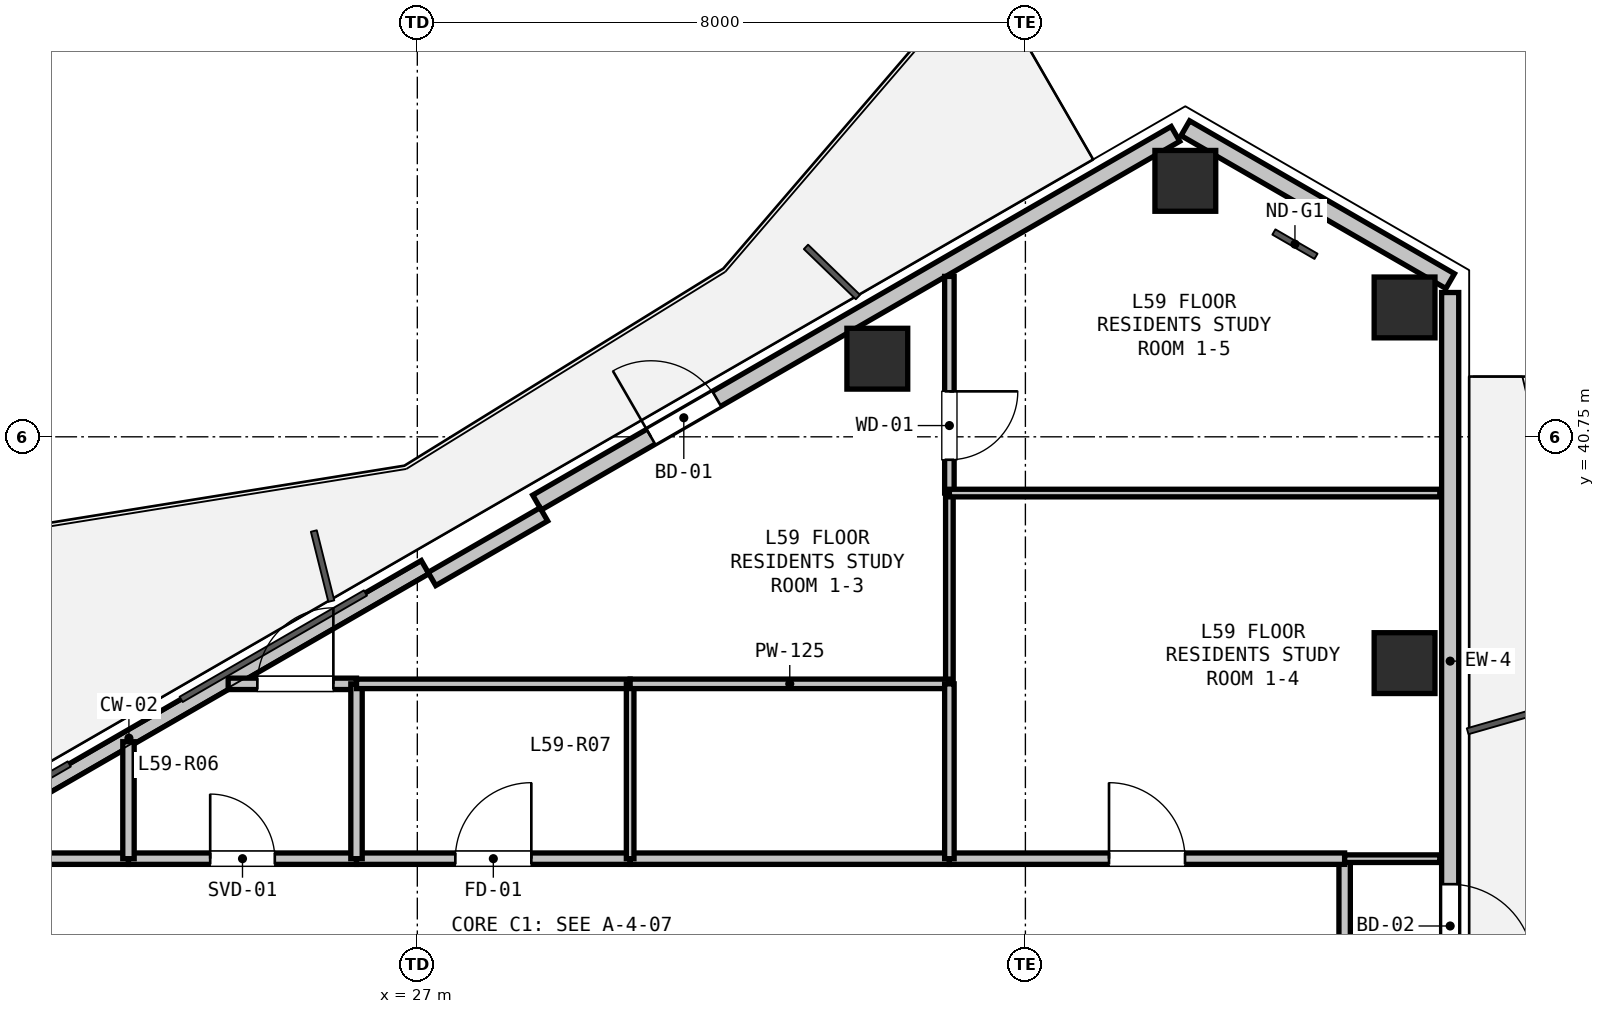
"""IFC4 building model, lengths in metres.
Left out: names, types, materials, properties, quantities, classifications, styles, units other than length and angle.
Written with IfcOpenShell. Run it as: python <this file> out.ifc"""

import sys

from ifc_helpers import new_model, si_unit, direction, frame, frame_2d, origin, origin_2d, place, context, subcontext, project, spatial, rectangle, hollow_rectangle, extrude, element, fill, save


model = new_model("IFC4")
c1 = context("Model", 3, precision=1e-05, world=origin(), true_north=direction((0.0, 1.0)))
c2 = subcontext(c1, "Body", "Model", "MODEL_VIEW")
j1 = project(units=[si_unit("LENGTHUNIT", "METRE"), si_unit("PLANEANGLEUNIT", "RADIAN")], contexts=[c1])
p1 = place(None, origin())
s1 = spatial("IfcSite", under=j1, at=p1, CompositionType="ELEMENT")
p2 = place(p1, origin())
s2 = spatial("IfcBuilding", under=s1, at=p2, CompositionType="ELEMENT")
p3 = place(p2, frame((0.0, 0.0, 211.8)))
s3 = spatial("IfcBuildingStorey", under=s2, at=p3, CompositionType="ELEMENT", Elevation=211.8)
for number, where, z_axis, x_axis in (
    (1, (33.052, 41.778, 0.0), (0.0, 0.0, 1.0), (1.0, 0.0, 0.0)),
    (2, (37.104, 44.117, 0.0), (0.0, 0.0, 1.0), (1.0, 0.0, 0.0)),
    (3, (39.988, 42.452, 0.0), (0.0, 0.0, 1.0), (1.0, 0.0, 0.0)),
    (4, (39.988, 37.773, 0.0), (0.0, 0.0, 1.0), (1.0, 0.0, 0.0)),
):
    element("IfcColumn", number, at=place(p3, frame(where, z_axis=z_axis, x_axis=x_axis)), inside=s3, PredefinedType="COLUMN", context=c2, shape_type="SweptSolid", body=[
        extrude(hollow_rectangle(XDim=0.8, YDim=0.8, WallThickness=0.025, at=origin_2d()), origin(), (0.0, 0.0, 1.0), 3.3),
    ])
p4 = place(p3, frame((37.104, 44.81, 0.0), z_axis=(0.0, 0.0, 1.0), x_axis=(0.866023907196, -0.500002592159, 0.0)))
e5 = element("IfcWall", 5, at=p4, inside=s3, PredefinedType="SOLIDWALL", context=c2, shape_type="SweptSolid", body=[
    extrude(rectangle(XDim=4.023, YDim=0.225, at=frame_2d((2.012, 0.0))), origin(), (0.0, 0.0, 1.0), 2.69),
])
p5 = place(p3, frame((19.309, 34.536, 0.0), z_axis=(0.0, 0.0, 1.0), x_axis=(0.866020680503, 0.500008180874, 0.0)))
e6 = element("IfcWall", 6, at=p5, inside=s3, PredefinedType="PARAPET", context=c2, shape_type="SweptSolid", body=[
    extrude(rectangle(XDim=8.999, YDim=0.2, at=frame_2d((4.5, 0.0))), origin(), (0.0, 0.0, 1.0), 0.2),
])
p6 = place(p3, frame((28.575, 39.885, 0.0), z_axis=(0.0, 0.0, 1.0), x_axis=(0.866016233231, 0.500015883528, 0.0)))
e7 = element("IfcWall", 7, at=p6, inside=s3, PredefinedType="SOLIDWALL", context=c2, shape_type="SweptSolid", body=[
    extrude(rectangle(XDim=9.699, YDim=0.225, at=frame_2d((4.85, 0.0))), origin(), (0.0, 0.0, 1.0), 2.69),
])
p7 = place(p6, frame((1.73, 0.0, 0.0)))
e8 = element("IfcOpeningElement", 8, at=p7, cuts=e7, PredefinedType="OPENING", context=c2, shape_type="SweptSolid", body=[
    extrude(rectangle(XDim=1.0, YDim=2.1, at=frame_2d((0.5, 1.05))), frame((0.0, 0.123, 0.0), z_axis=(0.0, -1.0, 0.0), x_axis=(1.0, 0.0, 0.0)), (0.0, 0.0, 1.0), 0.245),
])
p8 = place(p3, frame((27.192, 38.88, 0.0), z_axis=(0.0, 0.0, 1.0), x_axis=(0.866025371046, 0.500000056704, 0.0)))
e9 = element("IfcWall", 9, at=p8, inside=s3, PredefinedType="PARAPET", context=c2, shape_type="SweptSolid", body=[
    extrude(rectangle(XDim=1.7, YDim=0.2, at=frame_2d((0.85, 0.0))), origin(), (0.0, 0.0, 1.0), 2.69),
])
p9 = place(p3, frame((40.588, 42.648, 0.0), z_axis=(0.0, 0.0, 1.0), x_axis=(0.0, -1.0, 0.0)))
e10 = element("IfcWall", 10, at=p9, inside=s3, PredefinedType="SOLIDWALL", context=c2, shape_type="SweptSolid", body=[
    extrude(rectangle(XDim=9.699, YDim=0.225, at=frame_2d((4.85, 0.0))), origin(), (0.0, 0.0, 1.0), 2.69),
])
p10 = place(p9, frame((7.784, 0.0, 0.0)))
e11 = element("IfcOpeningElement", 11, at=p10, cuts=e10, PredefinedType="OPENING", context=c2, shape_type="SweptSolid", body=[
    extrude(rectangle(XDim=1.1, YDim=2.1, at=frame_2d((0.55, 1.05))), frame((0.0, 0.123, 0.0), z_axis=(0.0, -1.0, 0.0), x_axis=(1.0, 0.0, 0.0)), (0.0, 0.0, 1.0), 0.245),
])
p11 = place(p3, frame((39.2, 35.2, 0.0), z_axis=(0.0, 0.0, 1.0), x_axis=(0.0, -1.0, 0.0)))
e12 = element("IfcWall", 12, at=p11, inside=s3, PredefinedType="PARTITIONING", context=c2, shape_type="SweptSolid", body=[
    extrude(rectangle(XDim=2.45, YDim=0.15, at=frame_2d((1.225, 0.0))), origin(), (0.0, 0.0, 1.0), 3.07),
])
p12 = place(p3, frame((20.528, 35.2, 0.0), z_axis=(0.0, 0.0, 1.0), x_axis=(1.0, 0.0, 0.0)))
e13 = element("IfcWall", 13, at=p12, inside=s3, PredefinedType="PARTITIONING", context=c2, shape_type="SweptSolid", body=[
    extrude(rectangle(XDim=2.672, YDim=0.15, at=frame_2d((1.336, 0.0))), origin(), (0.0, 0.0, 1.0), 2.365),
])
p13 = place(p3, frame((23.2, 35.2, 0.0), z_axis=(0.0, 0.0, 1.0), x_axis=(1.0, 0.0, 0.0)))
e14 = element("IfcWall", 14, at=p13, inside=s3, PredefinedType="PARTITIONING", context=c2, shape_type="SweptSolid", body=[
    extrude(rectangle(XDim=3.0, YDim=0.15, at=frame_2d((1.5, 0.0))), origin(), (0.0, 0.0, 1.0), 3.07),
])
p14 = place(p13, frame((1.075, 0.0, 0.0)))
e15 = element("IfcOpeningElement", 15, at=p14, cuts=e14, PredefinedType="OPENING", context=c2, shape_type="SweptSolid", body=[
    extrude(rectangle(XDim=0.85, YDim=2.1, at=frame_2d((0.425, 1.05))), frame((0.0, 0.085, 0.0), z_axis=(0.0, -1.0, 0.0), x_axis=(1.0, 0.0, 0.0)), (0.0, 0.0, 1.0), 0.17),
])
p15 = place(p3, frame((26.2, 35.2, 0.0), z_axis=(0.0, 0.0, 1.0), x_axis=(1.0, 0.0, 0.0)))
e16 = element("IfcWall", 16, at=p15, inside=s3, PredefinedType="PARTITIONING", context=c2, shape_type="SweptSolid", body=[
    extrude(rectangle(XDim=3.6, YDim=0.15, at=frame_2d((1.8, 0.0))), origin(), (0.0, 0.0, 1.0), 3.07),
])
p16 = place(p15, frame((1.3, 0.0, 0.0)))
e17 = element("IfcOpeningElement", 17, at=p16, cuts=e16, PredefinedType="OPENING", context=c2, shape_type="SweptSolid", body=[
    extrude(rectangle(XDim=1.0, YDim=2.15, at=frame_2d((0.5, 1.075))), frame((0.0, 0.085, 0.0), z_axis=(0.0, -1.0, 0.0), x_axis=(1.0, 0.0, 0.0)), (0.0, 0.0, 1.0), 0.17),
])
p17 = place(p3, frame((29.8, 35.2, 0.0), z_axis=(0.0, 0.0, 1.0), x_axis=(1.0, 0.0, 0.0)))
e18 = element("IfcWall", 18, at=p17, inside=s3, PredefinedType="PARTITIONING", context=c2, shape_type="SweptSolid", body=[
    extrude(rectangle(XDim=4.2, YDim=0.15, at=frame_2d((2.1, 0.0))), origin(), (0.0, 0.0, 1.0), 3.07),
])
p18 = place(p3, frame((34.0, 35.2, 0.0), z_axis=(0.0, 0.0, 1.0), x_axis=(1.0, 0.0, 0.0)))
e19 = element("IfcWall", 19, at=p18, inside=s3, PredefinedType="PARTITIONING", context=c2, shape_type="SweptSolid", body=[
    extrude(rectangle(XDim=5.2, YDim=0.15, at=frame_2d((2.6, 0.0))), origin(), (0.0, 0.0, 1.0), 2.518),
])
p19 = place(p18, frame((2.1, 0.0, 0.0)))
e20 = element("IfcOpeningElement", 20, at=p19, cuts=e19, PredefinedType="OPENING", context=c2, shape_type="SweptSolid", body=[
    extrude(rectangle(XDim=1.0, YDim=2.15, at=frame_2d((0.5, 1.075))), frame((0.0, 0.085, 0.0), z_axis=(0.0, -1.0, 0.0), x_axis=(1.0, 0.0, 0.0)), (0.0, 0.0, 1.0), 0.17),
])
p20 = place(p3, frame((24.512, 37.5, 0.0), z_axis=(0.0, 0.0, 1.0), x_axis=(1.0, 0.0, 0.0)))
e21 = element("IfcWall", 21, at=p20, inside=s3, PredefinedType="PARTITIONING", context=c2, shape_type="SweptSolid", body=[
    extrude(rectangle(XDim=1.688, YDim=0.15, at=frame_2d((0.844, 0.0))), origin(), (0.0, 0.0, 1.0), 2.365),
])
p21 = place(p20, frame((0.384, 0.0, 0.0)))
e22 = element("IfcOpeningElement", 22, at=p21, cuts=e21, PredefinedType="OPENING", context=c2, shape_type="SweptSolid", body=[
    extrude(rectangle(XDim=1.0, YDim=2.15, at=frame_2d((0.5, 1.075))), frame((0.0, 0.085, 0.0), z_axis=(0.0, -1.0, 0.0), x_axis=(1.0, 0.0, 0.0)), (0.0, 0.0, 1.0), 0.17),
])
p22 = place(p3, frame((26.2, 37.5, 0.0), z_axis=(0.0, 0.0, 1.0), x_axis=(0.0, -1.0, 0.0)))
e23 = element("IfcWall", 23, at=p22, inside=s3, PredefinedType="PARTITIONING", context=c2, shape_type="SweptSolid", body=[
    extrude(rectangle(XDim=2.3, YDim=0.15, at=frame_2d((1.15, 0.0))), origin(), (0.0, 0.0, 1.0), 3.07),
])
p23 = place(p3, frame((23.2, 35.2, 0.0), z_axis=(0.0, 0.0, 1.0), x_axis=(0.0, 1.0, 0.0)))
e24 = element("IfcWall", 24, at=p23, inside=s3, PredefinedType="PARTITIONING", context=c2, shape_type="SweptSolid", body=[
    extrude(rectangle(XDim=1.539, YDim=0.15, at=frame_2d((0.769, 0.0))), origin(), (0.0, 0.0, 1.0), 2.365),
])
p24 = place(p3, frame((26.2, 37.5, 0.0), z_axis=(0.0, 0.0, 1.0), x_axis=(1.0, 0.0, 0.0)))
e25 = element("IfcWall", 25, at=p24, inside=s3, PredefinedType="PARTITIONING", context=c2, shape_type="SweptSolid", body=[
    extrude(rectangle(XDim=3.6, YDim=0.125, at=frame_2d((1.8, 0.0))), origin(), (0.0, 0.0, 1.0), 3.07),
])
p25 = place(p3, frame((29.8, 37.5, 0.0), z_axis=(0.0, 0.0, 1.0), x_axis=(0.0, -1.0, 0.0)))
e26 = element("IfcWall", 26, at=p25, inside=s3, PredefinedType="PARTITIONING", context=c2, shape_type="SweptSolid", body=[
    extrude(rectangle(XDim=2.3, YDim=0.1, at=frame_2d((1.15, 0.0))), origin(), (0.0, 0.0, 1.0), 3.07),
])
p26 = place(p3, frame((34.0, 42.86, 0.0), z_axis=(0.0, 0.0, 1.0), x_axis=(0.0, -1.0, 0.0)))
e27 = element("IfcWall", 27, at=p26, inside=s3, PredefinedType="PARTITIONING", context=c2, shape_type="SweptSolid", body=[
    extrude(rectangle(XDim=2.85, YDim=0.125, at=frame_2d((1.425, 0.0))), origin(), (0.0, 0.0, 1.0), 2.795),
])
p27 = place(p26, frame((1.512, 0.0, 0.0)))
e28 = element("IfcOpeningElement", 28, at=p27, cuts=e27, PredefinedType="OPENING", context=c2, shape_type="SweptSolid", body=[
    extrude(rectangle(XDim=0.9, YDim=2.1, at=frame_2d((0.45, 1.05))), frame((0.0, 0.073, 0.0), z_axis=(0.0, -1.0, 0.0), x_axis=(1.0, 0.0, 0.0)), (0.0, 0.0, 1.0), 0.145),
])
p28 = place(p3, frame((34.0, 40.01, 0.0), z_axis=(0.0, 0.0, 1.0), x_axis=(0.0, -1.0, 0.0)))
e29 = element("IfcWall", 29, at=p28, inside=s3, PredefinedType="PARTITIONING", context=c2, shape_type="SweptSolid", body=[
    extrude(rectangle(XDim=2.51, YDim=0.1, at=frame_2d((1.255, 0.0))), origin(), (0.0, 0.0, 1.0), 3.07),
])
p29 = place(p3, frame((34.0, 37.5, 0.0), z_axis=(0.0, 0.0, 1.0), x_axis=(-1.0, 0.0, 0.0)))
e30 = element("IfcWall", 30, at=p29, inside=s3, PredefinedType="PARTITIONING", context=c2, shape_type="SweptSolid", body=[
    extrude(rectangle(XDim=4.2, YDim=0.125, at=frame_2d((2.1, 0.0))), origin(), (0.0, 0.0, 1.0), 3.07),
])
p30 = place(p3, frame((40.452, 35.2, 0.0), z_axis=(0.0, 0.0, 1.0), x_axis=(-1.0, 0.0, 0.0)))
e31 = element("IfcWall", 31, at=p30, inside=s3, PredefinedType="PARTITIONING", context=c2, shape_type="SweptSolid", body=[
    extrude(rectangle(XDim=1.252, YDim=0.1, at=frame_2d((0.626, 0.0))), origin(), (0.0, 0.0, 1.0), 2.365),
])
p31 = place(p3, frame((34.0, 35.2, 0.0), z_axis=(0.0, 0.0, 1.0), x_axis=(0.0, 1.0, 0.0)))
e32 = element("IfcWall", 32, at=p31, inside=s3, PredefinedType="PARTITIONING", context=c2, shape_type="SweptSolid", body=[
    extrude(rectangle(XDim=2.3, YDim=0.125, at=frame_2d((1.15, 0.0))), origin(), (0.0, 0.0, 1.0), 3.07),
])
p32 = place(p3, frame((34.0, 40.01, 0.0), z_axis=(0.0, 0.0, 1.0), x_axis=(1.0, 0.0, 0.0)))
e33 = element("IfcWall", 33, at=p32, inside=s3, PredefinedType="PARTITIONING", context=c2, shape_type="SweptSolid", body=[
    extrude(rectangle(XDim=6.452, YDim=0.1, at=frame_2d((3.226, 0.0))), origin(), (0.0, 0.0, 1.0), 2.518),
])
p33 = place(p7, origin())
e34 = element("IfcDoor", 34, at=p33, inside=s3, OperationType="SINGLE_SWING_LEFT", PredefinedType="DOOR", context=c2, shape_type="SweptSolid", body=[
    extrude(rectangle(XDim=1.0, YDim=2.1, at=frame_2d((0.5, 1.05))), frame((0.0, 0.025, 0.0), z_axis=(0.0, -1.0, 0.0), x_axis=(1.0, 0.0, 0.0)), (0.0, 0.0, 1.0), 0.05),
])
fill(e8, e34)
p34 = place(p10, origin())
e35 = element("IfcDoor", 35, at=p34, inside=s3, OperationType="SINGLE_SWING_RIGHT", PredefinedType="DOOR", context=c2, shape_type="SweptSolid", body=[
    extrude(rectangle(XDim=1.1, YDim=2.1, at=frame_2d((0.55, 1.05))), frame((0.0, 0.025, 0.0), z_axis=(0.0, -1.0, 0.0), x_axis=(1.0, 0.0, 0.0)), (0.0, 0.0, 1.0), 0.05),
])
fill(e11, e35)
p35 = place(p14, origin())
e36 = element("IfcDoor", 36, at=p35, inside=s3, OperationType="SINGLE_SWING_LEFT", PredefinedType="DOOR", context=c2, shape_type="SweptSolid", body=[
    extrude(rectangle(XDim=0.85, YDim=2.1, at=frame_2d((0.425, 1.05))), frame((0.0, 0.025, 0.0), z_axis=(0.0, -1.0, 0.0), x_axis=(1.0, 0.0, 0.0)), (0.0, 0.0, 1.0), 0.05),
])
fill(e15, e36)
p36 = place(p16, origin())
e37 = element("IfcDoor", 37, at=p36, inside=s3, OperationType="SINGLE_SWING_RIGHT", PredefinedType="DOOR", context=c2, shape_type="SweptSolid", body=[
    extrude(rectangle(XDim=1.0, YDim=2.15, at=frame_2d((0.5, 1.075))), frame((0.0, 0.025, 0.0), z_axis=(0.0, -1.0, 0.0), x_axis=(1.0, 0.0, 0.0)), (0.0, 0.0, 1.0), 0.05),
])
fill(e17, e37)
p37 = place(p19, origin())
e38 = element("IfcDoor", 38, at=p37, inside=s3, OperationType="SINGLE_SWING_LEFT", PredefinedType="DOOR", context=c2, shape_type="SweptSolid", body=[
    extrude(rectangle(XDim=1.0, YDim=2.15, at=frame_2d((0.5, 1.075))), frame((0.0, 0.025, 0.0), z_axis=(0.0, -1.0, 0.0), x_axis=(1.0, 0.0, 0.0)), (0.0, 0.0, 1.0), 0.05),
])
fill(e20, e38)
p38 = place(p21, origin())
e39 = element("IfcDoor", 39, at=p38, inside=s3, OperationType="SINGLE_SWING_RIGHT", PredefinedType="DOOR", context=c2, shape_type="SweptSolid", body=[
    extrude(rectangle(XDim=1.0, YDim=2.15, at=frame_2d((0.5, 1.075))), frame((0.0, 0.025, 0.0), z_axis=(0.0, -1.0, 0.0), x_axis=(1.0, 0.0, 0.0)), (0.0, 0.0, 1.0), 0.05),
])
fill(e22, e39)
p39 = place(p27, origin())
e40 = element("IfcDoor", 40, at=p39, inside=s3, OperationType="SINGLE_SWING_LEFT", PredefinedType="DOOR", context=c2, shape_type="SweptSolid", body=[
    extrude(rectangle(XDim=0.9, YDim=2.1, at=frame_2d((0.45, 1.05))), frame((0.0, 0.025, 0.0), z_axis=(0.0, -1.0, 0.0), x_axis=(1.0, 0.0, 0.0)), (0.0, 0.0, 1.0), 0.05),
])
fill(e28, e40)
save(model, sys.argv[1])
